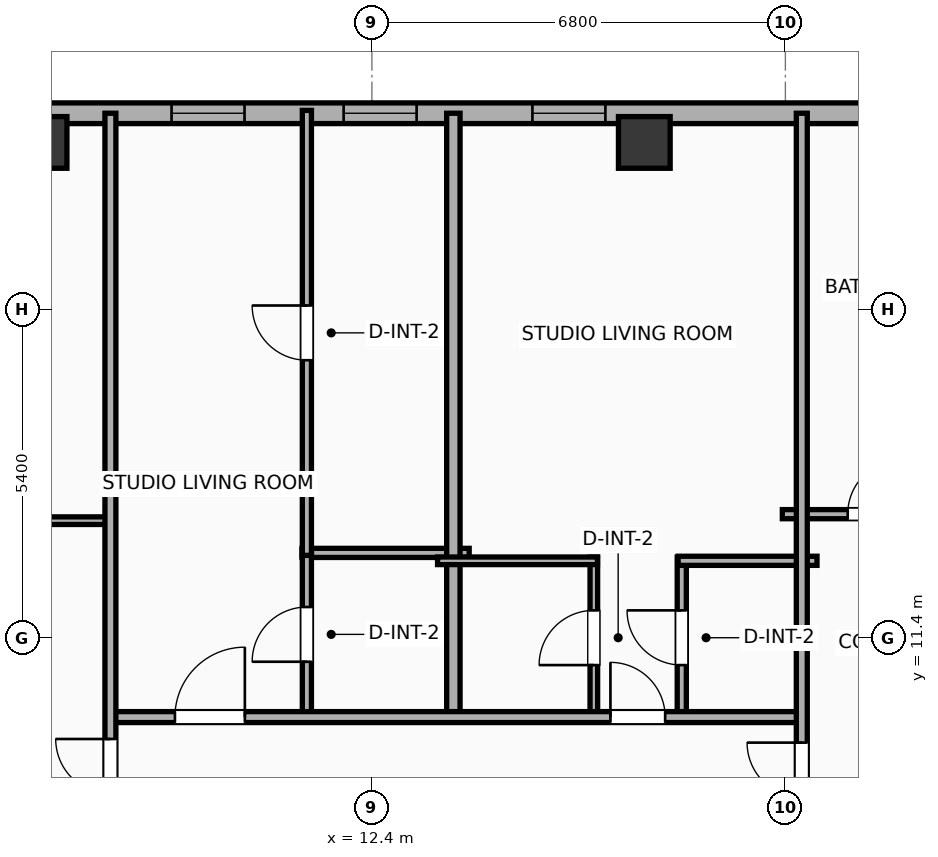
"""IFC4 building model, lengths in metres.
Left out: names, types, materials, properties, quantities, classifications, styles, units other than length and angle.
Written with IfcOpenShell. Run it as: python <this file> out.ifc"""

import sys

from ifc_helpers import new_model, si_unit, direction, frame, frame_2d, origin, origin_2d, place, context, subcontext, project, spatial, rectangle, hollow_rectangle, extrude, element, fill, save


model = new_model("IFC4")
c1 = context("Model", 3, precision=1e-05, world=origin(), true_north=direction((0.0, 1.0)))
c2 = subcontext(c1, "Body", "Model", "MODEL_VIEW")
j1 = project(units=[si_unit("LENGTHUNIT", "METRE"), si_unit("PLANEANGLEUNIT", "RADIAN")], contexts=[c1])
p1 = place(None, origin())
s1 = spatial("IfcSite", under=j1, at=p1, CompositionType="ELEMENT")
p2 = place(p1, origin())
s2 = spatial("IfcBuilding", under=s1, at=p2, CompositionType="ELEMENT")
p3 = place(p2, frame((0.0, 0.0, 200.2)))
s3 = spatial("IfcBuildingStorey", under=s2, at=p3, CompositionType="ELEMENT", Elevation=200.2)
for number, where, z_axis, x_axis in (
    (1, (16.88, 19.55, 0.0), (0.0, 0.0, 1.0), (1.0, 0.0, 0.0)),
    (2, (6.96, 19.55, 0.0), (0.0, 0.0, 1.0), (1.0, 0.0, 0.0)),
):
    element("IfcColumn", number, at=place(p3, frame(where, z_axis=z_axis, x_axis=x_axis)), inside=s3, PredefinedType="COLUMN", context=c2, shape_type="SweptSolid", body=[
        extrude(hollow_rectangle(XDim=0.85, YDim=0.85, WallThickness=0.028, at=origin_2d()), origin(), (0.0, 0.0, 1.0), 3.9),
    ])
p4 = place(p3, frame((-22.783, 20.03, 0.0), z_axis=(0.0, 0.0, 1.0), x_axis=(1.0, 0.0, 0.0)))
e3 = element("IfcWall", 3, at=p4, inside=s3, PredefinedType="ELEMENTEDWALL", context=c2, shape_type="SweptSolid", body=[
    extrude(rectangle(XDim=49.566, YDim=0.34, at=frame_2d((24.783, 0.0))), origin(), (0.0, 0.0, 1.0), 2.54),
])
p5 = place(p4, frame((6.211, 0.0, 0.75)))
e4 = element("IfcOpeningElement", 4, at=p5, cuts=e3, PredefinedType="OPENING", context=c2, shape_type="SweptSolid", body=[
    extrude(rectangle(XDim=2.4, YDim=1.63, at=frame_2d((1.2, 0.815))), frame((0.0, 0.18, 0.0), z_axis=(0.0, -1.0, 0.0), x_axis=(1.0, 0.0, 0.0)), (0.0, 0.0, 1.0), 0.36),
])
p6 = place(p4, frame((23.583, 0.0, 0.75)))
e5 = element("IfcOpeningElement", 5, at=p6, cuts=e3, PredefinedType="OPENING", context=c2, shape_type="SweptSolid", body=[
    extrude(rectangle(XDim=2.4, YDim=1.63, at=frame_2d((1.2, 0.815))), frame((0.0, 0.18, 0.0), z_axis=(0.0, -1.0, 0.0), x_axis=(1.0, 0.0, 0.0)), (0.0, 0.0, 1.0), 0.36),
])
p7 = place(p4, frame((3.893, 0.0, 0.75)))
e6 = element("IfcOpeningElement", 6, at=p7, cuts=e3, PredefinedType="OPENING", context=c2, shape_type="SweptSolid", body=[
    extrude(rectangle(XDim=1.2, YDim=1.63, at=frame_2d((0.6, 0.815))), frame((0.0, 0.18, 0.0), z_axis=(0.0, -1.0, 0.0), x_axis=(1.0, 0.0, 0.0)), (0.0, 0.0, 1.0), 0.36),
])
p8 = place(p4, frame((11.273, 0.0, 0.75)))
e7 = element("IfcOpeningElement", 7, at=p8, cuts=e3, PredefinedType="OPENING", context=c2, shape_type="SweptSolid", body=[
    extrude(rectangle(XDim=1.2, YDim=1.63, at=frame_2d((0.6, 0.815))), frame((0.0, 0.18, 0.0), z_axis=(0.0, -1.0, 0.0), x_axis=(1.0, 0.0, 0.0)), (0.0, 0.0, 1.0), 0.36),
])
p9 = place(p4, frame((31.889, 0.0, 0.75)))
e8 = element("IfcOpeningElement", 8, at=p9, cuts=e3, PredefinedType="OPENING", context=c2, shape_type="SweptSolid", body=[
    extrude(rectangle(XDim=1.2, YDim=1.63, at=frame_2d((0.6, 0.815))), frame((0.0, 0.18, 0.0), z_axis=(0.0, -1.0, 0.0), x_axis=(1.0, 0.0, 0.0)), (0.0, 0.0, 1.0), 0.36),
])
p10 = place(p4, frame((34.719, 0.0, 0.75)))
e9 = element("IfcOpeningElement", 9, at=p10, cuts=e3, PredefinedType="OPENING", context=c2, shape_type="SweptSolid", body=[
    extrude(rectangle(XDim=1.2, YDim=1.63, at=frame_2d((0.6, 0.815))), frame((0.0, 0.18, 0.0), z_axis=(0.0, -1.0, 0.0), x_axis=(1.0, 0.0, 0.0)), (0.0, 0.0, 1.0), 0.36),
])
p11 = place(p4, frame((37.823, 0.0, 0.75)))
e10 = element("IfcOpeningElement", 10, at=p11, cuts=e3, PredefinedType="OPENING", context=c2, shape_type="SweptSolid", body=[
    extrude(rectangle(XDim=1.2, YDim=1.63, at=frame_2d((0.6, 0.815))), frame((0.0, 0.18, 0.0), z_axis=(0.0, -1.0, 0.0), x_axis=(1.0, 0.0, 0.0)), (0.0, 0.0, 1.0), 0.36),
])
p12 = place(p4, frame((16.113, 0.0, 0.75)))
e11 = element("IfcOpeningElement", 11, at=p12, cuts=e3, PredefinedType="OPENING", context=c2, shape_type="SweptSolid", body=[
    extrude(rectangle(XDim=1.2, YDim=1.63, at=frame_2d((0.6, 0.815))), frame((0.0, 0.18, 0.0), z_axis=(0.0, -1.0, 0.0), x_axis=(1.0, 0.0, 0.0)), (0.0, 0.0, 1.0), 0.36),
])
p13 = place(p4, frame((20.513, 0.0, 0.75)))
e12 = element("IfcOpeningElement", 12, at=p13, cuts=e3, PredefinedType="OPENING", context=c2, shape_type="SweptSolid", body=[
    extrude(rectangle(XDim=1.2, YDim=1.63, at=frame_2d((0.6, 0.815))), frame((0.0, 0.18, 0.0), z_axis=(0.0, -1.0, 0.0), x_axis=(1.0, 0.0, 0.0)), (0.0, 0.0, 1.0), 0.36),
])
p14 = place(p4, frame((27.893, 0.0, 0.75)))
e13 = element("IfcOpeningElement", 13, at=p14, cuts=e3, PredefinedType="OPENING", context=c2, shape_type="SweptSolid", body=[
    extrude(rectangle(XDim=1.2, YDim=1.63, at=frame_2d((0.6, 0.815))), frame((0.0, 0.18, 0.0), z_axis=(0.0, -1.0, 0.0), x_axis=(1.0, 0.0, 0.0)), (0.0, 0.0, 1.0), 0.36),
])
p15 = place(p4, frame((45.393, 0.0, 0.75)))
e14 = element("IfcOpeningElement", 14, at=p15, cuts=e3, PredefinedType="OPENING", context=c2, shape_type="SweptSolid", body=[
    extrude(rectangle(XDim=1.2, YDim=1.63, at=frame_2d((0.6, 0.815))), frame((0.0, 0.18, 0.0), z_axis=(0.0, -1.0, 0.0), x_axis=(1.0, 0.0, 0.0)), (0.0, 0.0, 1.0), 0.36),
])
p16 = place(p4, frame((47.28, 0.0, 0.75)))
e15 = element("IfcOpeningElement", 15, at=p16, cuts=e3, PredefinedType="OPENING", context=c2, shape_type="SweptSolid", body=[
    extrude(rectangle(XDim=1.2, YDim=1.63, at=frame_2d((0.6, 0.815))), frame((0.0, 0.18, 0.0), z_axis=(0.0, -1.0, 0.0), x_axis=(1.0, 0.0, 0.0)), (0.0, 0.0, 1.0), 0.36),
])
p17 = place(p3, frame((11.251, 12.8, 0.0), z_axis=(0.0, 0.0, 1.0), x_axis=(1.0, 0.0, 0.0)))
e16 = element("IfcWall", 16, at=p17, inside=s3, PredefinedType="PLUMBINGWALL", context=c2, shape_type="SweptSolid", body=[
    extrude(rectangle(XDim=2.749, YDim=0.15, at=frame_2d((1.375, 0.0))), origin(), (0.0, 0.0, 1.0), 3.65),
])
p18 = place(p3, frame((11.331, 10.08, 0.0), z_axis=(0.0, 0.0, 1.0), x_axis=(0.0, 1.0, 0.0)))
e17 = element("IfcWall", 17, at=p18, inside=s3, PredefinedType="PLUMBINGWALL", context=c2, shape_type="SweptSolid", body=[
    extrude(rectangle(XDim=2.76, YDim=0.15, at=frame_2d((1.38, 0.0))), origin(), (0.0, 0.0, 1.0), 3.65),
])
p19 = place(p18, frame((0.93, 0.0, 0.0)))
e18 = element("IfcOpeningElement", 18, at=p19, cuts=e17, PredefinedType="OPENING", context=c2, shape_type="SweptSolid", body=[
    extrude(rectangle(XDim=0.9, YDim=2.05, at=frame_2d((0.45, 1.025))), frame((0.0, 0.085, 0.0), z_axis=(0.0, -1.0, 0.0), x_axis=(1.0, 0.0, 0.0)), (0.0, 0.0, 1.0), 0.17),
])
p20 = place(p3, frame((11.331, 12.76, 0.0), z_axis=(0.0, 0.0, 1.0), x_axis=(0.0, 1.0, 0.0)))
e19 = element("IfcWall", 19, at=p20, inside=s3, PredefinedType="PLUMBINGWALL", context=c2, shape_type="SweptSolid", body=[
    extrude(rectangle(XDim=7.317, YDim=0.15, at=frame_2d((3.658, 0.0))), origin(), (0.0, 0.0, 1.0), 3.65),
])
p21 = place(p20, frame((3.208, 0.0, 0.0)))
e20 = element("IfcOpeningElement", 20, at=p21, cuts=e19, PredefinedType="OPENING", context=c2, shape_type="SweptSolid", body=[
    extrude(rectangle(XDim=0.9, YDim=2.05, at=frame_2d((0.45, 1.025))), frame((0.0, 0.085, 0.0), z_axis=(0.0, -1.0, 0.0), x_axis=(1.0, 0.0, 0.0)), (0.0, 0.0, 1.0), 0.17),
])
p22 = place(p3, frame((13.74, 10.02, 0.0), z_axis=(0.0, 0.0, 1.0), x_axis=(0.0, 1.0, 0.0)))
e21 = element("IfcWall", 21, at=p22, inside=s3, PredefinedType="PARTITIONING", context=c2, shape_type="SweptSolid", body=[
    extrude(rectangle(XDim=10.01, YDim=0.22, at=frame_2d((5.005, 0.0))), origin(), (0.0, 0.0, 1.0), 3.65),
])
p23 = place(p3, frame((16.05, 10.08, 0.0), z_axis=(0.0, 0.0, 1.0), x_axis=(0.0, 1.0, 0.0)))
e22 = element("IfcWall", 22, at=p23, inside=s3, PredefinedType="PARTITIONING", context=c2, shape_type="SweptSolid", body=[
    extrude(rectangle(XDim=2.65, YDim=0.125, at=frame_2d((1.325, 0.0))), origin(), (0.0, 0.0, 1.0), 2.54),
])
p24 = place(p23, frame((0.875, 0.0, 0.0)))
e23 = element("IfcOpeningElement", 23, at=p24, cuts=e22, PredefinedType="OPENING", context=c2, shape_type="SweptSolid", body=[
    extrude(rectangle(XDim=0.9, YDim=2.05, at=frame_2d((0.45, 1.025))), frame((0.0, 0.073, 0.0), z_axis=(0.0, -1.0, 0.0), x_axis=(1.0, 0.0, 0.0)), (0.0, 0.0, 1.0), 0.145),
])
p25 = place(p3, frame((17.496, 10.08, 0.0), z_axis=(0.0, 0.0, 1.0), x_axis=(0.0, 1.0, 0.0)))
e24 = element("IfcWall", 24, at=p25, inside=s3, PredefinedType="PLUMBINGWALL", context=c2, shape_type="SweptSolid", body=[
    extrude(rectangle(XDim=2.65, YDim=0.15, at=frame_2d((1.325, 0.0))), origin(), (0.0, 0.0, 1.0), 3.65),
])
p26 = place(p25, frame((0.875, 0.0, 0.0)))
e25 = element("IfcOpeningElement", 25, at=p26, cuts=e24, PredefinedType="OPENING", context=c2, shape_type="SweptSolid", body=[
    extrude(rectangle(XDim=0.9, YDim=2.05, at=frame_2d((0.45, 1.025))), frame((0.0, 0.085, 0.0), z_axis=(0.0, -1.0, 0.0), x_axis=(1.0, 0.0, 0.0)), (0.0, 0.0, 1.0), 0.17),
])
p27 = place(p3, frame((13.48, 12.67, 0.0), z_axis=(0.0, 0.0, 1.0), x_axis=(1.0, 0.0, 0.0)))
e26 = element("IfcWall", 26, at=p27, inside=s3, PredefinedType="PARTITIONING", context=c2, shape_type="SweptSolid", body=[
    extrude(rectangle(XDim=2.63, YDim=0.125, at=frame_2d((1.315, 0.0))), origin(), (0.0, 0.0, 1.0), 3.65),
])
p28 = place(p3, frame((17.436, 12.67, 0.0), z_axis=(0.0, 0.0, 1.0), x_axis=(1.0, 0.0, 0.0)))
e27 = element("IfcWall", 27, at=p28, inside=s3, PredefinedType="PLUMBINGWALL", context=c2, shape_type="SweptSolid", body=[
    extrude(rectangle(XDim=2.284, YDim=0.15, at=frame_2d((1.142, 0.0))), origin(), (0.0, 0.0, 1.0), 3.65),
])
p29 = place(p3, frame((8.08, 10.1, 0.0), z_axis=(0.0, 0.0, 1.0), x_axis=(1.0, 0.0, 0.0)))
e28 = element("IfcWall", 28, at=p29, inside=s3, PredefinedType="PARTITIONING", context=c2, shape_type="SweptSolid", body=[
    extrude(rectangle(XDim=11.42, YDim=0.18, at=frame_2d((5.71, 0.0))), origin(), (0.0, 0.0, 1.0), 3.65),
])
p30 = place(p29, frame((1.081, 0.0, 0.0)))
e29 = element("IfcOpeningElement", 29, at=p30, cuts=e28, PredefinedType="OPENING", context=c2, shape_type="SweptSolid", body=[
    extrude(rectangle(XDim=1.15, YDim=2.05, at=frame_2d((0.575, 1.025))), frame((0.0, 0.1, 0.0), z_axis=(0.0, -1.0, 0.0), x_axis=(1.0, 0.0, 0.0)), (0.0, 0.0, 1.0), 0.2),
])
p31 = place(p29, frame((8.243, 0.0, 0.0)))
e30 = element("IfcOpeningElement", 30, at=p31, cuts=e28, PredefinedType="OPENING", context=c2, shape_type="SweptSolid", body=[
    extrude(rectangle(XDim=0.9, YDim=2.05, at=frame_2d((0.45, 1.025))), frame((0.0, 0.1, 0.0), z_axis=(0.0, -1.0, 0.0), x_axis=(1.0, 0.0, 0.0)), (0.0, 0.0, 1.0), 0.2),
])
p32 = place(p3, frame((0.02, 13.33, 0.0), z_axis=(0.0, 0.0, 1.0), x_axis=(1.0, 0.0, 0.0)))
e31 = element("IfcWall", 31, at=p32, inside=s3, PredefinedType="PARTITIONING", context=c2, shape_type="SweptSolid", body=[
    extrude(rectangle(XDim=8.06, YDim=0.125, at=frame_2d((4.03, 0.0))), origin(), (0.0, 0.0, 1.0), 3.65),
])
p33 = place(p32, frame((1.323, 0.0, 0.0)))
e32 = element("IfcOpeningElement", 32, at=p33, cuts=e31, PredefinedType="OPENING", context=c2, shape_type="SweptSolid", body=[
    extrude(rectangle(XDim=0.9, YDim=2.05, at=frame_2d((0.45, 1.025))), frame((0.0, 0.073, 0.0), z_axis=(0.0, -1.0, 0.0), x_axis=(1.0, 0.0, 0.0)), (0.0, 0.0, 1.0), 0.145),
])
p34 = place(p32, frame((5.837, 0.0, 0.0)))
e33 = element("IfcOpeningElement", 33, at=p34, cuts=e31, PredefinedType="OPENING", context=c2, shape_type="SweptSolid", body=[
    extrude(rectangle(XDim=0.9, YDim=2.05, at=frame_2d((0.45, 1.025))), frame((0.0, 0.073, 0.0), z_axis=(0.0, -1.0, 0.0), x_axis=(1.0, 0.0, 0.0)), (0.0, 0.0, 1.0), 0.145),
])
p35 = place(p3, frame((8.1, 8.49, 0.0), z_axis=(0.0, 0.0, 1.0), x_axis=(0.0, 1.0, 0.0)))
e34 = element("IfcWall", 34, at=p35, inside=s3, PredefinedType="PARTITIONING", context=c2, shape_type="SweptSolid", body=[
    extrude(rectangle(XDim=11.54, YDim=0.18, at=frame_2d((5.77, 0.0))), origin(), (0.0, 0.0, 1.0), 3.65),
])
p36 = place(p35, frame((0.35, 0.0, 0.0)))
e35 = element("IfcOpeningElement", 35, at=p36, cuts=e34, PredefinedType="OPENING", context=c2, shape_type="SweptSolid", body=[
    extrude(rectangle(XDim=0.9, YDim=2.05, at=frame_2d((0.45, 1.025))), frame((0.0, 0.1, 0.0), z_axis=(0.0, -1.0, 0.0), x_axis=(1.0, 0.0, 0.0)), (0.0, 0.0, 1.0), 0.2),
])
p37 = place(p3, frame((19.15, 13.437, 0.0), z_axis=(0.0, 0.0, 1.0), x_axis=(1.0, 0.0, 0.0)))
e36 = element("IfcWall", 36, at=p37, inside=s3, PredefinedType="PLUMBINGWALL", context=c2, shape_type="SweptSolid", body=[
    extrude(rectangle(XDim=3.05, YDim=0.15, at=frame_2d((1.525, 0.0))), origin(), (0.0, 0.0, 1.0), 3.65),
])
p38 = place(p37, frame((1.075, 0.0, 0.0)))
e37 = element("IfcOpeningElement", 37, at=p38, cuts=e36, PredefinedType="OPENING", context=c2, shape_type="SweptSolid", body=[
    extrude(rectangle(XDim=0.9, YDim=2.05, at=frame_2d((0.45, 1.025))), frame((0.0, 0.085, 0.0), z_axis=(0.0, -1.0, 0.0), x_axis=(1.0, 0.0, 0.0)), (0.0, 0.0, 1.0), 0.17),
])
p39 = place(p3, frame((19.47, -1.6, 0.0), z_axis=(0.0, 0.0, 1.0), x_axis=(0.0, 1.0, 0.0)))
e38 = element("IfcWall", 38, at=p39, inside=s3, PredefinedType="PARTITIONING", context=c2, shape_type="SweptSolid", body=[
    extrude(rectangle(XDim=21.63, YDim=0.18, at=frame_2d((10.815, 0.0))), origin(), (0.0, 0.0, 1.0), 3.65),
])
p40 = place(p39, frame((10.38, 0.0, 0.0)))
e39 = element("IfcOpeningElement", 39, at=p40, cuts=e38, PredefinedType="OPENING", context=c2, shape_type="SweptSolid", body=[
    extrude(rectangle(XDim=0.9, YDim=2.05, at=frame_2d((0.45, 1.025))), frame((0.0, 0.1, 0.0), z_axis=(0.0, -1.0, 0.0), x_axis=(1.0, 0.0, 0.0)), (0.0, 0.0, 1.0), 0.2),
])
p41 = place(p9, origin())
e40 = element("IfcWindow", 40, at=p41, inside=s3, PartitioningType="SINGLE_PANEL", PredefinedType="WINDOW", context=c2, shape_type="SweptSolid", body=[
    extrude(rectangle(XDim=1.2, YDim=1.63, at=frame_2d((0.6, 0.815))), frame((0.0, 0.03, 0.0), z_axis=(0.0, -1.0, 0.0), x_axis=(1.0, 0.0, 0.0)), (0.0, 0.0, 1.0), 0.06),
])
fill(e8, e40)
p42 = place(p10, origin())
e41 = element("IfcWindow", 41, at=p42, inside=s3, PartitioningType="SINGLE_PANEL", PredefinedType="WINDOW", context=c2, shape_type="SweptSolid", body=[
    extrude(rectangle(XDim=1.2, YDim=1.63, at=frame_2d((0.6, 0.815))), frame((0.0, 0.03, 0.0), z_axis=(0.0, -1.0, 0.0), x_axis=(1.0, 0.0, 0.0)), (0.0, 0.0, 1.0), 0.06),
])
fill(e9, e41)
p43 = place(p11, origin())
e42 = element("IfcWindow", 42, at=p43, inside=s3, PartitioningType="SINGLE_PANEL", PredefinedType="WINDOW", context=c2, shape_type="SweptSolid", body=[
    extrude(rectangle(XDim=1.2, YDim=1.63, at=frame_2d((0.6, 0.815))), frame((0.0, 0.03, 0.0), z_axis=(0.0, -1.0, 0.0), x_axis=(1.0, 0.0, 0.0)), (0.0, 0.0, 1.0), 0.06),
])
fill(e10, e42)
p44 = place(p19, origin())
e43 = element("IfcDoor", 43, at=p44, inside=s3, OperationType="SINGLE_SWING_LEFT", PredefinedType="DOOR", context=c2, shape_type="SweptSolid", body=[
    extrude(rectangle(XDim=0.9, YDim=2.05, at=frame_2d((0.45, 1.025))), frame((0.0, 0.025, 0.0), z_axis=(0.0, -1.0, 0.0), x_axis=(1.0, 0.0, 0.0)), (0.0, 0.0, 1.0), 0.05),
])
fill(e18, e43)
p45 = place(p21, origin())
e44 = element("IfcDoor", 44, at=p45, inside=s3, OperationType="SINGLE_SWING_RIGHT", PredefinedType="DOOR", context=c2, shape_type="SweptSolid", body=[
    extrude(rectangle(XDim=0.9, YDim=2.05, at=frame_2d((0.45, 1.025))), frame((0.0, 0.025, 0.0), z_axis=(0.0, -1.0, 0.0), x_axis=(1.0, 0.0, 0.0)), (0.0, 0.0, 1.0), 0.05),
])
fill(e20, e44)
p46 = place(p24, origin())
e45 = element("IfcDoor", 45, at=p46, inside=s3, OperationType="SINGLE_SWING_LEFT", PredefinedType="DOOR", context=c2, shape_type="SweptSolid", body=[
    extrude(rectangle(XDim=0.9, YDim=2.05, at=frame_2d((0.45, 1.025))), frame((0.0, 0.025, 0.0), z_axis=(0.0, -1.0, 0.0), x_axis=(1.0, 0.0, 0.0)), (0.0, 0.0, 1.0), 0.05),
])
fill(e23, e45)
p47 = place(p26, origin())
e46 = element("IfcDoor", 46, at=p47, inside=s3, OperationType="SINGLE_SWING_RIGHT", PredefinedType="DOOR", context=c2, shape_type="SweptSolid", body=[
    extrude(rectangle(XDim=0.9, YDim=2.05, at=frame_2d((0.45, 1.025))), frame((0.0, 0.025, 0.0), z_axis=(0.0, -1.0, 0.0), x_axis=(1.0, 0.0, 0.0)), (0.0, 0.0, 1.0), 0.05),
])
fill(e25, e46)
p48 = place(p30, origin())
e47 = element("IfcDoor", 47, at=p48, inside=s3, OperationType="SINGLE_SWING_RIGHT", PredefinedType="DOOR", context=c2, shape_type="SweptSolid", body=[
    extrude(rectangle(XDim=1.15, YDim=2.05, at=frame_2d((0.575, 1.025))), frame((0.0, 0.025, 0.0), z_axis=(0.0, -1.0, 0.0), x_axis=(1.0, 0.0, 0.0)), (0.0, 0.0, 1.0), 0.05),
])
fill(e29, e47)
p49 = place(p31, origin())
e48 = element("IfcDoor", 48, at=p49, inside=s3, OperationType="SINGLE_SWING_LEFT", PredefinedType="DOOR", context=c2, shape_type="SweptSolid", body=[
    extrude(rectangle(XDim=0.9, YDim=2.05, at=frame_2d((0.45, 1.025))), frame((0.0, 0.025, 0.0), z_axis=(0.0, -1.0, 0.0), x_axis=(1.0, 0.0, 0.0)), (0.0, 0.0, 1.0), 0.05),
])
fill(e30, e48)
p50 = place(p36, origin())
e49 = element("IfcDoor", 49, at=p50, inside=s3, OperationType="SINGLE_SWING_RIGHT", PredefinedType="DOOR", context=c2, shape_type="SweptSolid", body=[
    extrude(rectangle(XDim=0.9, YDim=2.05, at=frame_2d((0.45, 1.025))), frame((0.0, 0.025, 0.0), z_axis=(0.0, -1.0, 0.0), x_axis=(1.0, 0.0, 0.0)), (0.0, 0.0, 1.0), 0.05),
])
fill(e35, e49)
p51 = place(p38, origin())
e50 = element("IfcDoor", 50, at=p51, inside=s3, OperationType="SINGLE_SWING_RIGHT", PredefinedType="DOOR", context=c2, shape_type="SweptSolid", body=[
    extrude(rectangle(XDim=0.9, YDim=2.05, at=frame_2d((0.45, 1.025))), frame((0.0, 0.025, 0.0), z_axis=(0.0, -1.0, 0.0), x_axis=(1.0, 0.0, 0.0)), (0.0, 0.0, 1.0), 0.05),
])
fill(e37, e50)
p52 = place(p40, origin())
e51 = element("IfcDoor", 51, at=p52, inside=s3, OperationType="SINGLE_SWING_RIGHT", PredefinedType="DOOR", context=c2, shape_type="SweptSolid", body=[
    extrude(rectangle(XDim=0.9, YDim=2.05, at=frame_2d((0.45, 1.025))), frame((0.0, 0.025, 0.0), z_axis=(0.0, -1.0, 0.0), x_axis=(1.0, 0.0, 0.0)), (0.0, 0.0, 1.0), 0.05),
])
fill(e39, e51)
save(model, sys.argv[1])
